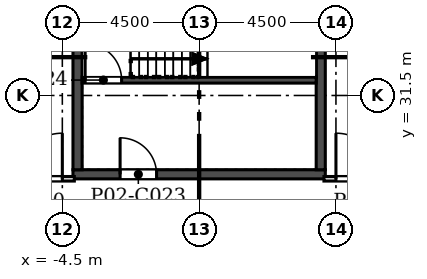
"""IFC4 building model, lengths in metres.
Left out: names, types, materials, properties, quantities, classifications, styles, units other than length and angle.
Written with IfcOpenShell. Run it as: python <this file> out.ifc"""

import sys

from ifc_helpers import new_model, si_unit, direction, frame, frame_2d, origin, place, context, subcontext, project, spatial, rectangle, extrude, element, fill, save


model = new_model("IFC4")
c1 = context("Model", 3, precision=1e-05, world=origin(), true_north=direction((0.0, 1.0)))
c2 = subcontext(c1, "Body", "Model", "MODEL_VIEW")
j1 = project(units=[si_unit("LENGTHUNIT", "METRE"), si_unit("PLANEANGLEUNIT", "RADIAN")], contexts=[c1])
p1 = place(None, origin())
s1 = spatial("IfcSite", under=j1, at=p1, CompositionType="ELEMENT")
p2 = place(p1, origin())
s2 = spatial("IfcBuilding", under=s1, at=p2, CompositionType="ELEMENT")
p3 = place(p2, frame((0.0, 0.0, 14.0)))
s3 = spatial("IfcBuildingStorey", under=s2, at=p3, CompositionType="ELEMENT", Elevation=14.0)
p4 = place(p3, frame((42.853, 8.575, 0.0), z_axis=(0.0, 0.0, 1.0), x_axis=(-0.49999894854, 0.866026010844, 0.0)))
e1 = element("IfcWall", 1, at=p4, inside=s3, PredefinedType="SOLIDWALL", context=c2, shape_type="SweptSolid", body=[
    extrude(rectangle(XDim=76.0, YDim=0.34, at=frame_2d((38.0, 0.0))), origin(), (0.0, 0.0, 1.0), 5.7),
])
p5 = place(p4, frame((1.058, 0.0, 0.9)))
e2 = element("IfcOpeningElement", 2, at=p5, cuts=e1, PredefinedType="OPENING", context=c2, shape_type="SweptSolid", body=[
    extrude(rectangle(XDim=1.885, YDim=3.5, at=frame_2d((0.942, 1.75))), frame((0.0, 0.18, 0.0), z_axis=(0.0, -1.0, 0.0), x_axis=(1.0, 0.0, 0.0)), (0.0, 0.0, 1.0), 0.36),
])
p6 = place(p4, frame((4.058, 0.0, 0.9)))
e3 = element("IfcOpeningElement", 3, at=p6, cuts=e1, PredefinedType="OPENING", context=c2, shape_type="SweptSolid", body=[
    extrude(rectangle(XDim=1.885, YDim=3.5, at=frame_2d((0.942, 1.75))), frame((0.0, 0.18, 0.0), z_axis=(0.0, -1.0, 0.0), x_axis=(1.0, 0.0, 0.0)), (0.0, 0.0, 1.0), 0.36),
])
p7 = place(p4, frame((7.058, 0.0, 0.9)))
e4 = element("IfcOpeningElement", 4, at=p7, cuts=e1, PredefinedType="OPENING", context=c2, shape_type="SweptSolid", body=[
    extrude(rectangle(XDim=1.885, YDim=3.5, at=frame_2d((0.942, 1.75))), frame((0.0, 0.18, 0.0), z_axis=(0.0, -1.0, 0.0), x_axis=(1.0, 0.0, 0.0)), (0.0, 0.0, 1.0), 0.36),
])
p8 = place(p4, frame((10.058, 0.0, 0.9)))
e5 = element("IfcOpeningElement", 5, at=p8, cuts=e1, PredefinedType="OPENING", context=c2, shape_type="SweptSolid", body=[
    extrude(rectangle(XDim=1.885, YDim=3.5, at=frame_2d((0.942, 1.75))), frame((0.0, 0.18, 0.0), z_axis=(0.0, -1.0, 0.0), x_axis=(1.0, 0.0, 0.0)), (0.0, 0.0, 1.0), 0.36),
])
p9 = place(p4, frame((13.058, 0.0, 0.9)))
e6 = element("IfcOpeningElement", 6, at=p9, cuts=e1, PredefinedType="OPENING", context=c2, shape_type="SweptSolid", body=[
    extrude(rectangle(XDim=1.885, YDim=3.5, at=frame_2d((0.942, 1.75))), frame((0.0, 0.18, 0.0), z_axis=(0.0, -1.0, 0.0), x_axis=(1.0, 0.0, 0.0)), (0.0, 0.0, 1.0), 0.36),
])
p10 = place(p4, frame((16.058, 0.0, 0.9)))
e7 = element("IfcOpeningElement", 7, at=p10, cuts=e1, PredefinedType="OPENING", context=c2, shape_type="SweptSolid", body=[
    extrude(rectangle(XDim=1.885, YDim=3.5, at=frame_2d((0.942, 1.75))), frame((0.0, 0.18, 0.0), z_axis=(0.0, -1.0, 0.0), x_axis=(1.0, 0.0, 0.0)), (0.0, 0.0, 1.0), 0.36),
])
p11 = place(p4, frame((19.058, 0.0, 0.9)))
e8 = element("IfcOpeningElement", 8, at=p11, cuts=e1, PredefinedType="OPENING", context=c2, shape_type="SweptSolid", body=[
    extrude(rectangle(XDim=1.885, YDim=3.5, at=frame_2d((0.942, 1.75))), frame((0.0, 0.18, 0.0), z_axis=(0.0, -1.0, 0.0), x_axis=(1.0, 0.0, 0.0)), (0.0, 0.0, 1.0), 0.36),
])
p12 = place(p4, frame((22.058, 0.0, 0.9)))
e9 = element("IfcOpeningElement", 9, at=p12, cuts=e1, PredefinedType="OPENING", context=c2, shape_type="SweptSolid", body=[
    extrude(rectangle(XDim=1.885, YDim=3.5, at=frame_2d((0.942, 1.75))), frame((0.0, 0.18, 0.0), z_axis=(0.0, -1.0, 0.0), x_axis=(1.0, 0.0, 0.0)), (0.0, 0.0, 1.0), 0.36),
])
p13 = place(p4, frame((25.058, 0.0, 0.9)))
e10 = element("IfcOpeningElement", 10, at=p13, cuts=e1, PredefinedType="OPENING", context=c2, shape_type="SweptSolid", body=[
    extrude(rectangle(XDim=1.885, YDim=3.5, at=frame_2d((0.942, 1.75))), frame((0.0, 0.18, 0.0), z_axis=(0.0, -1.0, 0.0), x_axis=(1.0, 0.0, 0.0)), (0.0, 0.0, 1.0), 0.36),
])
p14 = place(p4, frame((28.058, 0.0, 0.9)))
e11 = element("IfcOpeningElement", 11, at=p14, cuts=e1, PredefinedType="OPENING", context=c2, shape_type="SweptSolid", body=[
    extrude(rectangle(XDim=1.885, YDim=3.5, at=frame_2d((0.942, 1.75))), frame((0.0, 0.18, 0.0), z_axis=(0.0, -1.0, 0.0), x_axis=(1.0, 0.0, 0.0)), (0.0, 0.0, 1.0), 0.36),
])
p15 = place(p4, frame((31.058, 0.0, 0.9)))
e12 = element("IfcOpeningElement", 12, at=p15, cuts=e1, PredefinedType="OPENING", context=c2, shape_type="SweptSolid", body=[
    extrude(rectangle(XDim=1.885, YDim=3.5, at=frame_2d((0.942, 1.75))), frame((0.0, 0.18, 0.0), z_axis=(0.0, -1.0, 0.0), x_axis=(1.0, 0.0, 0.0)), (0.0, 0.0, 1.0), 0.36),
])
p16 = place(p4, frame((34.058, 0.0, 0.9)))
e13 = element("IfcOpeningElement", 13, at=p16, cuts=e1, PredefinedType="OPENING", context=c2, shape_type="SweptSolid", body=[
    extrude(rectangle(XDim=1.885, YDim=3.5, at=frame_2d((0.942, 1.75))), frame((0.0, 0.18, 0.0), z_axis=(0.0, -1.0, 0.0), x_axis=(1.0, 0.0, 0.0)), (0.0, 0.0, 1.0), 0.36),
])
p17 = place(p4, frame((37.058, 0.0, 0.9)))
e14 = element("IfcOpeningElement", 14, at=p17, cuts=e1, PredefinedType="OPENING", context=c2, shape_type="SweptSolid", body=[
    extrude(rectangle(XDim=1.885, YDim=3.5, at=frame_2d((0.942, 1.75))), frame((0.0, 0.18, 0.0), z_axis=(0.0, -1.0, 0.0), x_axis=(1.0, 0.0, 0.0)), (0.0, 0.0, 1.0), 0.36),
])
p18 = place(p4, frame((40.058, 0.0, 0.9)))
e15 = element("IfcOpeningElement", 15, at=p18, cuts=e1, PredefinedType="OPENING", context=c2, shape_type="SweptSolid", body=[
    extrude(rectangle(XDim=1.885, YDim=3.5, at=frame_2d((0.942, 1.75))), frame((0.0, 0.18, 0.0), z_axis=(0.0, -1.0, 0.0), x_axis=(1.0, 0.0, 0.0)), (0.0, 0.0, 1.0), 0.36),
])
p19 = place(p4, frame((43.058, 0.0, 0.9)))
e16 = element("IfcOpeningElement", 16, at=p19, cuts=e1, PredefinedType="OPENING", context=c2, shape_type="SweptSolid", body=[
    extrude(rectangle(XDim=1.885, YDim=3.5, at=frame_2d((0.942, 1.75))), frame((0.0, 0.18, 0.0), z_axis=(0.0, -1.0, 0.0), x_axis=(1.0, 0.0, 0.0)), (0.0, 0.0, 1.0), 0.36),
])
p20 = place(p4, frame((46.058, 0.0, 0.9)))
e17 = element("IfcOpeningElement", 17, at=p20, cuts=e1, PredefinedType="OPENING", context=c2, shape_type="SweptSolid", body=[
    extrude(rectangle(XDim=1.885, YDim=3.5, at=frame_2d((0.942, 1.75))), frame((0.0, 0.18, 0.0), z_axis=(0.0, -1.0, 0.0), x_axis=(1.0, 0.0, 0.0)), (0.0, 0.0, 1.0), 0.36),
])
p21 = place(p4, frame((49.058, 0.0, 0.9)))
e18 = element("IfcOpeningElement", 18, at=p21, cuts=e1, PredefinedType="OPENING", context=c2, shape_type="SweptSolid", body=[
    extrude(rectangle(XDim=1.885, YDim=3.5, at=frame_2d((0.942, 1.75))), frame((0.0, 0.18, 0.0), z_axis=(0.0, -1.0, 0.0), x_axis=(1.0, 0.0, 0.0)), (0.0, 0.0, 1.0), 0.36),
])
p22 = place(p4, frame((52.058, 0.0, 0.9)))
e19 = element("IfcOpeningElement", 19, at=p22, cuts=e1, PredefinedType="OPENING", context=c2, shape_type="SweptSolid", body=[
    extrude(rectangle(XDim=1.885, YDim=3.5, at=frame_2d((0.942, 1.75))), frame((0.0, 0.18, 0.0), z_axis=(0.0, -1.0, 0.0), x_axis=(1.0, 0.0, 0.0)), (0.0, 0.0, 1.0), 0.36),
])
p23 = place(p4, frame((55.058, 0.0, 0.9)))
e20 = element("IfcOpeningElement", 20, at=p23, cuts=e1, PredefinedType="OPENING", context=c2, shape_type="SweptSolid", body=[
    extrude(rectangle(XDim=1.885, YDim=3.5, at=frame_2d((0.942, 1.75))), frame((0.0, 0.18, 0.0), z_axis=(0.0, -1.0, 0.0), x_axis=(1.0, 0.0, 0.0)), (0.0, 0.0, 1.0), 0.36),
])
p24 = place(p4, frame((58.058, 0.0, 0.9)))
e21 = element("IfcOpeningElement", 21, at=p24, cuts=e1, PredefinedType="OPENING", context=c2, shape_type="SweptSolid", body=[
    extrude(rectangle(XDim=1.885, YDim=3.5, at=frame_2d((0.942, 1.75))), frame((0.0, 0.18, 0.0), z_axis=(0.0, -1.0, 0.0), x_axis=(1.0, 0.0, 0.0)), (0.0, 0.0, 1.0), 0.36),
])
p25 = place(p4, frame((61.058, 0.0, 0.9)))
e22 = element("IfcOpeningElement", 22, at=p25, cuts=e1, PredefinedType="OPENING", context=c2, shape_type="SweptSolid", body=[
    extrude(rectangle(XDim=1.885, YDim=3.5, at=frame_2d((0.942, 1.75))), frame((0.0, 0.18, 0.0), z_axis=(0.0, -1.0, 0.0), x_axis=(1.0, 0.0, 0.0)), (0.0, 0.0, 1.0), 0.36),
])
p26 = place(p4, frame((64.058, 0.0, 0.9)))
e23 = element("IfcOpeningElement", 23, at=p26, cuts=e1, PredefinedType="OPENING", context=c2, shape_type="SweptSolid", body=[
    extrude(rectangle(XDim=1.885, YDim=3.5, at=frame_2d((0.942, 1.75))), frame((0.0, 0.18, 0.0), z_axis=(0.0, -1.0, 0.0), x_axis=(1.0, 0.0, 0.0)), (0.0, 0.0, 1.0), 0.36),
])
p27 = place(p4, frame((67.058, 0.0, 0.9)))
e24 = element("IfcOpeningElement", 24, at=p27, cuts=e1, PredefinedType="OPENING", context=c2, shape_type="SweptSolid", body=[
    extrude(rectangle(XDim=1.885, YDim=3.5, at=frame_2d((0.942, 1.75))), frame((0.0, 0.18, 0.0), z_axis=(0.0, -1.0, 0.0), x_axis=(1.0, 0.0, 0.0)), (0.0, 0.0, 1.0), 0.36),
])
p28 = place(p4, frame((70.058, 0.0, 0.9)))
e25 = element("IfcOpeningElement", 25, at=p28, cuts=e1, PredefinedType="OPENING", context=c2, shape_type="SweptSolid", body=[
    extrude(rectangle(XDim=1.885, YDim=3.5, at=frame_2d((0.942, 1.75))), frame((0.0, 0.18, 0.0), z_axis=(0.0, -1.0, 0.0), x_axis=(1.0, 0.0, 0.0)), (0.0, 0.0, 1.0), 0.36),
])
p29 = place(p4, frame((73.058, 0.0, 0.9)))
e26 = element("IfcOpeningElement", 26, at=p29, cuts=e1, PredefinedType="OPENING", context=c2, shape_type="SweptSolid", body=[
    extrude(rectangle(XDim=1.885, YDim=3.5, at=frame_2d((0.942, 1.75))), frame((0.0, 0.18, 0.0), z_axis=(0.0, -1.0, 0.0), x_axis=(1.0, 0.0, 0.0)), (0.0, 0.0, 1.0), 0.36),
])
p30 = place(p3, frame((-4.853, 74.393, 0.0), z_axis=(0.0, 0.0, 1.0), x_axis=(-0.49999894854, -0.866026010844, 0.0)))
e27 = element("IfcWall", 27, at=p30, inside=s3, PredefinedType="SOLIDWALL", context=c2, shape_type="SweptSolid", body=[
    extrude(rectangle(XDim=76.0, YDim=0.34, at=frame_2d((38.0, 0.0))), origin(), (0.0, 0.0, 1.0), 5.7),
])
p31 = place(p30, frame((1.058, 0.0, 0.9)))
e28 = element("IfcOpeningElement", 28, at=p31, cuts=e27, PredefinedType="OPENING", context=c2, shape_type="SweptSolid", body=[
    extrude(rectangle(XDim=1.885, YDim=3.5, at=frame_2d((0.942, 1.75))), frame((0.0, 0.18, 0.0), z_axis=(0.0, -1.0, 0.0), x_axis=(1.0, 0.0, 0.0)), (0.0, 0.0, 1.0), 0.36),
])
p32 = place(p30, frame((4.058, 0.0, 0.9)))
e29 = element("IfcOpeningElement", 29, at=p32, cuts=e27, PredefinedType="OPENING", context=c2, shape_type="SweptSolid", body=[
    extrude(rectangle(XDim=1.885, YDim=3.5, at=frame_2d((0.942, 1.75))), frame((0.0, 0.18, 0.0), z_axis=(0.0, -1.0, 0.0), x_axis=(1.0, 0.0, 0.0)), (0.0, 0.0, 1.0), 0.36),
])
p33 = place(p30, frame((7.058, 0.0, 0.9)))
e30 = element("IfcOpeningElement", 30, at=p33, cuts=e27, PredefinedType="OPENING", context=c2, shape_type="SweptSolid", body=[
    extrude(rectangle(XDim=1.885, YDim=3.5, at=frame_2d((0.942, 1.75))), frame((0.0, 0.18, 0.0), z_axis=(0.0, -1.0, 0.0), x_axis=(1.0, 0.0, 0.0)), (0.0, 0.0, 1.0), 0.36),
])
p34 = place(p30, frame((10.058, 0.0, 0.9)))
e31 = element("IfcOpeningElement", 31, at=p34, cuts=e27, PredefinedType="OPENING", context=c2, shape_type="SweptSolid", body=[
    extrude(rectangle(XDim=1.885, YDim=3.5, at=frame_2d((0.942, 1.75))), frame((0.0, 0.18, 0.0), z_axis=(0.0, -1.0, 0.0), x_axis=(1.0, 0.0, 0.0)), (0.0, 0.0, 1.0), 0.36),
])
p35 = place(p30, frame((13.058, 0.0, 0.9)))
e32 = element("IfcOpeningElement", 32, at=p35, cuts=e27, PredefinedType="OPENING", context=c2, shape_type="SweptSolid", body=[
    extrude(rectangle(XDim=1.885, YDim=3.5, at=frame_2d((0.942, 1.75))), frame((0.0, 0.18, 0.0), z_axis=(0.0, -1.0, 0.0), x_axis=(1.0, 0.0, 0.0)), (0.0, 0.0, 1.0), 0.36),
])
p36 = place(p30, frame((16.058, 0.0, 0.9)))
e33 = element("IfcOpeningElement", 33, at=p36, cuts=e27, PredefinedType="OPENING", context=c2, shape_type="SweptSolid", body=[
    extrude(rectangle(XDim=1.885, YDim=3.5, at=frame_2d((0.942, 1.75))), frame((0.0, 0.18, 0.0), z_axis=(0.0, -1.0, 0.0), x_axis=(1.0, 0.0, 0.0)), (0.0, 0.0, 1.0), 0.36),
])
p37 = place(p30, frame((19.058, 0.0, 0.9)))
e34 = element("IfcOpeningElement", 34, at=p37, cuts=e27, PredefinedType="OPENING", context=c2, shape_type="SweptSolid", body=[
    extrude(rectangle(XDim=1.885, YDim=3.5, at=frame_2d((0.942, 1.75))), frame((0.0, 0.18, 0.0), z_axis=(0.0, -1.0, 0.0), x_axis=(1.0, 0.0, 0.0)), (0.0, 0.0, 1.0), 0.36),
])
p38 = place(p30, frame((22.058, 0.0, 0.9)))
e35 = element("IfcOpeningElement", 35, at=p38, cuts=e27, PredefinedType="OPENING", context=c2, shape_type="SweptSolid", body=[
    extrude(rectangle(XDim=1.885, YDim=3.5, at=frame_2d((0.942, 1.75))), frame((0.0, 0.18, 0.0), z_axis=(0.0, -1.0, 0.0), x_axis=(1.0, 0.0, 0.0)), (0.0, 0.0, 1.0), 0.36),
])
p39 = place(p30, frame((25.058, 0.0, 0.9)))
e36 = element("IfcOpeningElement", 36, at=p39, cuts=e27, PredefinedType="OPENING", context=c2, shape_type="SweptSolid", body=[
    extrude(rectangle(XDim=1.885, YDim=3.5, at=frame_2d((0.942, 1.75))), frame((0.0, 0.18, 0.0), z_axis=(0.0, -1.0, 0.0), x_axis=(1.0, 0.0, 0.0)), (0.0, 0.0, 1.0), 0.36),
])
p40 = place(p30, frame((28.058, 0.0, 0.9)))
e37 = element("IfcOpeningElement", 37, at=p40, cuts=e27, PredefinedType="OPENING", context=c2, shape_type="SweptSolid", body=[
    extrude(rectangle(XDim=1.885, YDim=3.5, at=frame_2d((0.942, 1.75))), frame((0.0, 0.18, 0.0), z_axis=(0.0, -1.0, 0.0), x_axis=(1.0, 0.0, 0.0)), (0.0, 0.0, 1.0), 0.36),
])
p41 = place(p30, frame((31.058, 0.0, 0.9)))
e38 = element("IfcOpeningElement", 38, at=p41, cuts=e27, PredefinedType="OPENING", context=c2, shape_type="SweptSolid", body=[
    extrude(rectangle(XDim=1.885, YDim=3.5, at=frame_2d((0.942, 1.75))), frame((0.0, 0.18, 0.0), z_axis=(0.0, -1.0, 0.0), x_axis=(1.0, 0.0, 0.0)), (0.0, 0.0, 1.0), 0.36),
])
p42 = place(p30, frame((34.058, 0.0, 0.9)))
e39 = element("IfcOpeningElement", 39, at=p42, cuts=e27, PredefinedType="OPENING", context=c2, shape_type="SweptSolid", body=[
    extrude(rectangle(XDim=1.885, YDim=3.5, at=frame_2d((0.942, 1.75))), frame((0.0, 0.18, 0.0), z_axis=(0.0, -1.0, 0.0), x_axis=(1.0, 0.0, 0.0)), (0.0, 0.0, 1.0), 0.36),
])
p43 = place(p30, frame((37.058, 0.0, 0.9)))
e40 = element("IfcOpeningElement", 40, at=p43, cuts=e27, PredefinedType="OPENING", context=c2, shape_type="SweptSolid", body=[
    extrude(rectangle(XDim=1.885, YDim=3.5, at=frame_2d((0.942, 1.75))), frame((0.0, 0.18, 0.0), z_axis=(0.0, -1.0, 0.0), x_axis=(1.0, 0.0, 0.0)), (0.0, 0.0, 1.0), 0.36),
])
p44 = place(p30, frame((40.058, 0.0, 0.9)))
e41 = element("IfcOpeningElement", 41, at=p44, cuts=e27, PredefinedType="OPENING", context=c2, shape_type="SweptSolid", body=[
    extrude(rectangle(XDim=1.885, YDim=3.5, at=frame_2d((0.942, 1.75))), frame((0.0, 0.18, 0.0), z_axis=(0.0, -1.0, 0.0), x_axis=(1.0, 0.0, 0.0)), (0.0, 0.0, 1.0), 0.36),
])
p45 = place(p30, frame((43.058, 0.0, 0.9)))
e42 = element("IfcOpeningElement", 42, at=p45, cuts=e27, PredefinedType="OPENING", context=c2, shape_type="SweptSolid", body=[
    extrude(rectangle(XDim=1.885, YDim=3.5, at=frame_2d((0.942, 1.75))), frame((0.0, 0.18, 0.0), z_axis=(0.0, -1.0, 0.0), x_axis=(1.0, 0.0, 0.0)), (0.0, 0.0, 1.0), 0.36),
])
p46 = place(p30, frame((46.058, 0.0, 0.9)))
e43 = element("IfcOpeningElement", 43, at=p46, cuts=e27, PredefinedType="OPENING", context=c2, shape_type="SweptSolid", body=[
    extrude(rectangle(XDim=1.885, YDim=3.5, at=frame_2d((0.942, 1.75))), frame((0.0, 0.18, 0.0), z_axis=(0.0, -1.0, 0.0), x_axis=(1.0, 0.0, 0.0)), (0.0, 0.0, 1.0), 0.36),
])
p47 = place(p30, frame((49.058, 0.0, 0.9)))
e44 = element("IfcOpeningElement", 44, at=p47, cuts=e27, PredefinedType="OPENING", context=c2, shape_type="SweptSolid", body=[
    extrude(rectangle(XDim=1.885, YDim=3.5, at=frame_2d((0.942, 1.75))), frame((0.0, 0.18, 0.0), z_axis=(0.0, -1.0, 0.0), x_axis=(1.0, 0.0, 0.0)), (0.0, 0.0, 1.0), 0.36),
])
p48 = place(p30, frame((52.058, 0.0, 0.9)))
e45 = element("IfcOpeningElement", 45, at=p48, cuts=e27, PredefinedType="OPENING", context=c2, shape_type="SweptSolid", body=[
    extrude(rectangle(XDim=1.885, YDim=3.5, at=frame_2d((0.942, 1.75))), frame((0.0, 0.18, 0.0), z_axis=(0.0, -1.0, 0.0), x_axis=(1.0, 0.0, 0.0)), (0.0, 0.0, 1.0), 0.36),
])
p49 = place(p30, frame((55.058, 0.0, 0.9)))
e46 = element("IfcOpeningElement", 46, at=p49, cuts=e27, PredefinedType="OPENING", context=c2, shape_type="SweptSolid", body=[
    extrude(rectangle(XDim=1.885, YDim=3.5, at=frame_2d((0.942, 1.75))), frame((0.0, 0.18, 0.0), z_axis=(0.0, -1.0, 0.0), x_axis=(1.0, 0.0, 0.0)), (0.0, 0.0, 1.0), 0.36),
])
p50 = place(p30, frame((58.058, 0.0, 0.9)))
e47 = element("IfcOpeningElement", 47, at=p50, cuts=e27, PredefinedType="OPENING", context=c2, shape_type="SweptSolid", body=[
    extrude(rectangle(XDim=1.885, YDim=3.5, at=frame_2d((0.942, 1.75))), frame((0.0, 0.18, 0.0), z_axis=(0.0, -1.0, 0.0), x_axis=(1.0, 0.0, 0.0)), (0.0, 0.0, 1.0), 0.36),
])
p51 = place(p30, frame((61.058, 0.0, 0.9)))
e48 = element("IfcOpeningElement", 48, at=p51, cuts=e27, PredefinedType="OPENING", context=c2, shape_type="SweptSolid", body=[
    extrude(rectangle(XDim=1.885, YDim=3.5, at=frame_2d((0.942, 1.75))), frame((0.0, 0.18, 0.0), z_axis=(0.0, -1.0, 0.0), x_axis=(1.0, 0.0, 0.0)), (0.0, 0.0, 1.0), 0.36),
])
p52 = place(p30, frame((64.058, 0.0, 0.9)))
e49 = element("IfcOpeningElement", 49, at=p52, cuts=e27, PredefinedType="OPENING", context=c2, shape_type="SweptSolid", body=[
    extrude(rectangle(XDim=1.885, YDim=3.5, at=frame_2d((0.942, 1.75))), frame((0.0, 0.18, 0.0), z_axis=(0.0, -1.0, 0.0), x_axis=(1.0, 0.0, 0.0)), (0.0, 0.0, 1.0), 0.36),
])
p53 = place(p30, frame((67.058, 0.0, 0.9)))
e50 = element("IfcOpeningElement", 50, at=p53, cuts=e27, PredefinedType="OPENING", context=c2, shape_type="SweptSolid", body=[
    extrude(rectangle(XDim=1.885, YDim=3.5, at=frame_2d((0.942, 1.75))), frame((0.0, 0.18, 0.0), z_axis=(0.0, -1.0, 0.0), x_axis=(1.0, 0.0, 0.0)), (0.0, 0.0, 1.0), 0.36),
])
p54 = place(p30, frame((70.058, 0.0, 0.9)))
e51 = element("IfcOpeningElement", 51, at=p54, cuts=e27, PredefinedType="OPENING", context=c2, shape_type="SweptSolid", body=[
    extrude(rectangle(XDim=1.885, YDim=3.5, at=frame_2d((0.942, 1.75))), frame((0.0, 0.18, 0.0), z_axis=(0.0, -1.0, 0.0), x_axis=(1.0, 0.0, 0.0)), (0.0, 0.0, 1.0), 0.36),
])
p55 = place(p30, frame((73.058, 0.0, 0.9)))
e52 = element("IfcOpeningElement", 52, at=p55, cuts=e27, PredefinedType="OPENING", context=c2, shape_type="SweptSolid", body=[
    extrude(rectangle(XDim=1.885, YDim=3.5, at=frame_2d((0.942, 1.75))), frame((0.0, 0.18, 0.0), z_axis=(0.0, -1.0, 0.0), x_axis=(1.0, 0.0, 0.0)), (0.0, 0.0, 1.0), 0.36),
])
p56 = place(p3, frame((-4.15, 28.907, -0.3), z_axis=(0.0, 0.0, 1.0), x_axis=(1.0, 0.0, 0.0)))
e53 = element("IfcWall", 53, at=p56, inside=s3, PredefinedType="SOLIDWALL", context=c2, shape_type="SweptSolid", body=[
    extrude(rectangle(XDim=8.3, YDim=0.3, at=frame_2d((4.15, 0.0))), origin(), (0.0, 0.0, 1.0), 6.0),
])
p57 = place(p56, frame((1.55, 0.0, 0.3)))
e54 = element("IfcOpeningElement", 54, at=p57, cuts=e53, PredefinedType="OPENING", context=c2, shape_type="SweptSolid", body=[
    extrude(rectangle(XDim=1.2, YDim=2.1, at=frame_2d((0.6, 1.05))), frame((0.0, 0.16, 0.0), z_axis=(0.0, -1.0, 0.0), x_axis=(1.0, 0.0, 0.0)), (0.0, 0.0, 1.0), 0.32),
])
for number, where, z_axis, x_axis in (
    (55, (-4.0, 29.057, -0.3), (0.0, 0.0, 1.0), (0.0, 1.0, 0.0)),
    (56, (4.0, 29.057, -0.3), (0.0, 0.0, 1.0), (0.0, 1.0, 0.0)),
):
    element("IfcWall", number, at=place(p3, frame(where, z_axis=z_axis, x_axis=x_axis)), inside=s3, PredefinedType="SOLIDWALL", context=c2, shape_type="SweptSolid", body=[
        extrude(rectangle(XDim=6.5, YDim=0.3, at=frame_2d((3.25, 0.0))), origin(), (0.0, 0.0, 1.0), 6.0),
    ])
p58 = place(p3, frame((-3.85, 32.007, -0.3), z_axis=(0.0, 0.0, 1.0), x_axis=(1.0, 0.0, 0.0)))
e57 = element("IfcWall", 57, at=p58, inside=s3, PredefinedType="SOLIDWALL", context=c2, shape_type="SweptSolid", body=[
    extrude(rectangle(XDim=7.7, YDim=0.2, at=frame_2d((3.85, 0.0))), origin(), (0.0, 0.0, 1.0), 6.0),
])
p59 = place(p58, frame((0.1, 0.0, 0.3)))
e58 = element("IfcOpeningElement", 58, at=p59, cuts=e57, PredefinedType="OPENING", context=c2, shape_type="SweptSolid", body=[
    extrude(rectangle(XDim=1.2, YDim=2.1, at=frame_2d((0.6, 1.05))), frame((0.0, 0.11, 0.0), z_axis=(0.0, -1.0, 0.0), x_axis=(1.0, 0.0, 0.0)), (0.0, 0.0, 1.0), 0.22),
])
p60 = place(p3, frame((-11.425, 28.76, 0.0), z_axis=(0.0, 0.0, 1.0), x_axis=(1.0, 0.0, 0.0)))
e59 = element("IfcWall", 59, at=p60, inside=s3, PredefinedType="PARTITIONING", context=c2, shape_type="SweptSolid", body=[
    extrude(rectangle(XDim=7.32, YDim=0.15, at=frame_2d((3.66, 0.0))), origin(), (0.0, 0.0, 1.0), 5.7),
])
p61 = place(p60, frame((3.925, 0.0, 0.0)))
e60 = element("IfcOpeningElement", 60, at=p61, cuts=e59, PredefinedType="OPENING", context=c2, shape_type="SweptSolid", body=[
    extrude(rectangle(XDim=3.0, YDim=2.4, at=frame_2d((1.5, 1.2))), frame((0.0, 0.085, 0.0), z_axis=(0.0, -1.0, 0.0), x_axis=(1.0, 0.0, 0.0)), (0.0, 0.0, 1.0), 0.17),
])
p62 = place(p3, frame((4.105, 28.76, 0.0), z_axis=(0.0, 0.0, 1.0), x_axis=(1.0, 0.0, 0.0)))
e61 = element("IfcWall", 61, at=p62, inside=s3, PredefinedType="PARTITIONING", context=c2, shape_type="SweptSolid", body=[
    extrude(rectangle(XDim=7.47, YDim=0.15, at=frame_2d((3.735, 0.0))), origin(), (0.0, 0.0, 1.0), 5.7),
])
p63 = place(p62, frame((0.395, 0.0, 0.0)))
e62 = element("IfcOpeningElement", 62, at=p63, cuts=e61, PredefinedType="OPENING", context=c2, shape_type="SweptSolid", body=[
    extrude(rectangle(XDim=3.0, YDim=2.4, at=frame_2d((1.5, 1.2))), frame((0.0, 0.085, 0.0), z_axis=(0.0, -1.0, 0.0), x_axis=(1.0, 0.0, 0.0)), (0.0, 0.0, 1.0), 0.17),
])
p64 = place(p57, origin())
e63 = element("IfcDoor", 63, at=p64, inside=s3, OperationType="SINGLE_SWING_LEFT", PredefinedType="DOOR", context=c2, shape_type="SweptSolid", body=[
    extrude(rectangle(XDim=1.2, YDim=2.1, at=frame_2d((0.6, 1.05))), frame((0.0, 0.025, 0.0), z_axis=(0.0, -1.0, 0.0), x_axis=(1.0, 0.0, 0.0)), (0.0, 0.0, 1.0), 0.05),
])
fill(e54, e63)
p65 = place(p59, origin())
e64 = element("IfcDoor", 64, at=p65, inside=s3, OperationType="SINGLE_SWING_LEFT", PredefinedType="DOOR", context=c2, shape_type="SweptSolid", body=[
    extrude(rectangle(XDim=1.2, YDim=2.1, at=frame_2d((0.6, 1.05))), frame((0.0, 0.025, 0.0), z_axis=(0.0, -1.0, 0.0), x_axis=(1.0, 0.0, 0.0)), (0.0, 0.0, 1.0), 0.05),
])
fill(e58, e64)
p66 = place(p61, origin())
e65 = element("IfcDoor", 65, at=p66, inside=s3, OperationType="DOUBLE_DOOR_SINGLE_SWING", PredefinedType="DOOR", context=c2, shape_type="SweptSolid", body=[
    extrude(rectangle(XDim=3.0, YDim=2.4, at=frame_2d((1.5, 1.2))), frame((0.0, 0.025, 0.0), z_axis=(0.0, -1.0, 0.0), x_axis=(1.0, 0.0, 0.0)), (0.0, 0.0, 1.0), 0.05),
])
fill(e60, e65)
p67 = place(p63, origin())
e66 = element("IfcDoor", 66, at=p67, inside=s3, OperationType="DOUBLE_DOOR_SINGLE_SWING", PredefinedType="DOOR", context=c2, shape_type="SweptSolid", body=[
    extrude(rectangle(XDim=3.0, YDim=2.4, at=frame_2d((1.5, 1.2))), frame((0.0, 0.025, 0.0), z_axis=(0.0, -1.0, 0.0), x_axis=(1.0, 0.0, 0.0)), (0.0, 0.0, 1.0), 0.05),
])
fill(e62, e66)
save(model, sys.argv[1])
